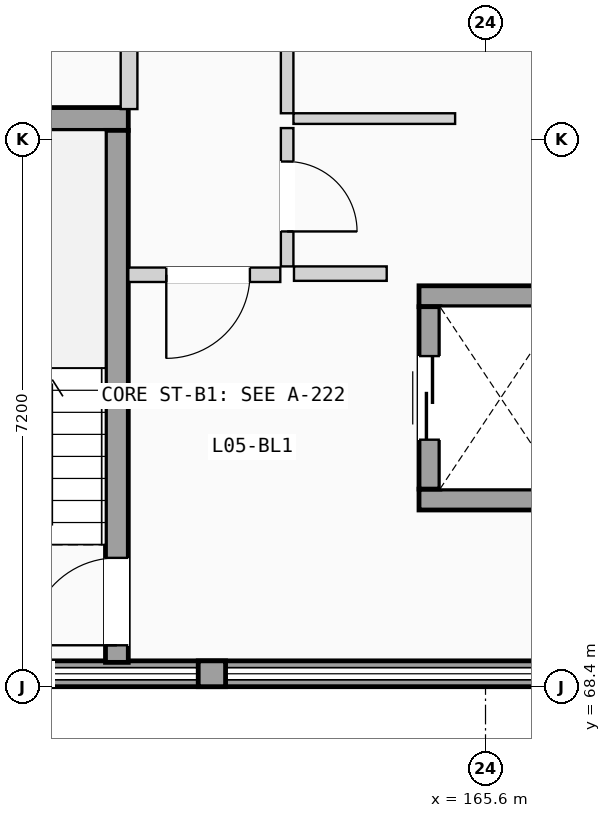
"""IFC4 building model, lengths in metres.
Left out: names, types, materials, properties, quantities, classifications, styles, units other than length and angle.
Written with IfcOpenShell. Run it as: python <this file> out.ifc"""

import sys

from ifc_helpers import new_model, si_unit, direction, frame, frame_2d, origin, place, context, subcontext, project, spatial, rectangle, extrude, element, fill, save


model = new_model("IFC4")
c1 = context("Model", 3, precision=1e-05, world=origin(), true_north=direction((0.0, 1.0)))
c2 = subcontext(c1, "Body", "Model", "MODEL_VIEW")
j1 = project(units=[si_unit("LENGTHUNIT", "METRE"), si_unit("PLANEANGLEUNIT", "RADIAN")], contexts=[c1])
p1 = place(None, origin())
s1 = spatial("IfcSite", under=j1, at=p1, CompositionType="ELEMENT")
p2 = place(p1, origin())
s2 = spatial("IfcBuilding", under=s1, at=p2, CompositionType="ELEMENT")
p3 = place(p2, frame((0.0, 0.0, 18.375)))
s3 = spatial("IfcBuildingStorey", under=s2, at=p3, CompositionType="ELEMENT", Elevation=18.375)
p4 = place(p3, frame((151.2, 68.57, 0.0), z_axis=(0.0, 0.0, 1.0), x_axis=(1.0, 0.0, 0.0)))
e1 = element("IfcWall", 1, at=p4, inside=s3, PredefinedType="SOLIDWALL", context=c2, shape_type="SweptSolid", body=[
    extrude(rectangle(XDim=21.6, YDim=0.34, at=frame_2d((10.8, 0.0))), origin(), (0.0, 0.0, 1.0), 1.11),
])
p5 = place(p3, frame((161.82, 68.57, 1.11), z_axis=(0.0, 0.0, 1.0), x_axis=(1.0, 0.0, 0.0)))
e2 = element("IfcWall", 2, at=p5, inside=s3, PredefinedType="SOLIDWALL", context=c2, shape_type="SweptSolid", body=[
    extrude(rectangle(XDim=0.36, YDim=0.34, at=frame_2d((0.18, 0.0))), origin(), (0.0, 0.0, 1.0), 1.78),
])
p6 = place(p3, frame((156.95, 75.87, 0.0), z_axis=(0.0, 0.0, 1.0), x_axis=(1.0, 0.0, 0.0)))
e3 = element("IfcWall", 3, at=p6, inside=s3, PredefinedType="SHEAR", context=c2, shape_type="SweptSolid", body=[
    extrude(rectangle(XDim=3.95, YDim=0.3, at=frame_2d((1.975, 0.0))), origin(), (0.0, 0.0, 1.0), 2.89),
])
p7 = place(p3, frame((160.75, 68.72, 0.0), z_axis=(0.0, 0.0, 1.0), x_axis=(0.0, 1.0, 0.0)))
e4 = element("IfcWall", 4, at=p7, inside=s3, PredefinedType="SHEAR", context=c2, shape_type="SweptSolid", body=[
    extrude(rectangle(XDim=7.0, YDim=0.3, at=frame_2d((3.5, 0.0))), origin(), (0.0, 0.0, 1.0), 2.89),
])
p8 = place(p7, frame((0.225, 0.0, 0.0)))
e5 = element("IfcOpeningElement", 5, at=p8, cuts=e4, PredefinedType="OPENING", context=c2, shape_type="SweptSolid", body=[
    extrude(rectangle(XDim=1.15, YDim=2.12, at=frame_2d((0.575, 1.06))), frame((0.0, 0.16, 0.0), z_axis=(0.0, -1.0, 0.0), x_axis=(1.0, 0.0, 0.0)), (0.0, 0.0, 1.0), 0.32),
])
for number, where, z_axis, x_axis in (
    (6, (164.725, 70.863, 0.0), (0.0, 0.0, 1.0), (1.0, 0.0, 0.0)),
    (7, (164.725, 73.538, 0.0), (0.0, 0.0, 1.0), (1.0, 0.0, 0.0)),
):
    element("IfcWall", number, at=place(p3, frame(where, z_axis=z_axis, x_axis=x_axis)), inside=s3, PredefinedType="SHEAR", context=c2, shape_type="SweptSolid", body=[
        extrude(rectangle(XDim=2.15, YDim=0.275, at=frame_2d((1.075, 0.0))), origin(), (0.0, 0.0, 1.0), 2.89),
    ])
p9 = place(p3, frame((164.863, 71.0, 0.0), z_axis=(0.0, 0.0, 1.0), x_axis=(0.0, 1.0, 0.0)))
e8 = element("IfcWall", 8, at=p9, inside=s3, PredefinedType="SHEAR", context=c2, shape_type="SweptSolid", body=[
    extrude(rectangle(XDim=2.4, YDim=0.275, at=frame_2d((1.2, 0.0))), origin(), (0.0, 0.0, 1.0), 2.89),
])
p10 = place(p9, frame((0.65, 0.0, 0.0)))
e9 = element("IfcOpeningElement", 9, at=p10, cuts=e8, PredefinedType="OPENING", context=c2, shape_type="SweptSolid", body=[
    extrude(rectangle(XDim=1.1, YDim=2.15, at=frame_2d((0.55, 1.075))), frame((0.0, 0.147, 0.0), z_axis=(0.0, -1.0, 0.0), x_axis=(1.0, 0.0, 0.0)), (0.0, 0.0, 1.0), 0.295),
])
p11 = place(p3, frame((163.08, 73.835, 0.0), z_axis=(0.0, 0.0, 1.0), x_axis=(1.0, 0.0, 0.0)))
e10 = element("IfcWall", 10, at=p11, inside=s3, PredefinedType="PARTITIONING", context=c2, shape_type="SweptSolid", body=[
    extrude(rectangle(XDim=1.22, YDim=0.19, at=frame_2d((0.61, 0.0))), origin(), (0.0, 0.0, 1.0), 2.87),
])
p12 = place(p3, frame((160.9, 73.82, 0.0), z_axis=(0.0, 0.0, 1.0), x_axis=(1.0, 0.0, 0.0)))
e11 = element("IfcWall", 11, at=p12, inside=s3, PredefinedType="PARTITIONING", context=c2, shape_type="SweptSolid", body=[
    extrude(rectangle(XDim=2.0, YDim=0.19, at=frame_2d((1.0, 0.0))), origin(), (0.0, 0.0, 1.0), 2.87),
])
p13 = place(p12, frame((0.5, 0.0, 0.0)))
e12 = element("IfcOpeningElement", 12, at=p13, cuts=e11, PredefinedType="OPENING", context=c2, shape_type="SweptSolid", body=[
    extrude(rectangle(XDim=1.1, YDim=2.12, at=frame_2d((0.55, 1.06))), frame((0.0, 0.105, 0.0), z_axis=(0.0, -1.0, 0.0), x_axis=(1.0, 0.0, 0.0)), (0.0, 0.0, 1.0), 0.21),
])
p14 = place(p3, frame((162.99, 73.93, 0.0), z_axis=(0.0, 0.0, 1.0), x_axis=(0.0, 1.0, 0.0)))
e13 = element("IfcWall", 13, at=p14, inside=s3, PredefinedType="PARTITIONING", context=c2, shape_type="SweptSolid", body=[
    extrude(rectangle(XDim=1.82, YDim=0.165, at=frame_2d((0.91, 0.0))), origin(), (0.0, 0.0, 1.0), 2.87),
])
p15 = place(p14, frame((0.46, 0.0, 0.0)))
e14 = element("IfcOpeningElement", 14, at=p15, cuts=e13, PredefinedType="OPENING", context=c2, shape_type="SweptSolid", body=[
    extrude(rectangle(XDim=0.92, YDim=2.04, at=frame_2d((0.46, 1.02))), frame((0.0, 0.093, 0.0), z_axis=(0.0, -1.0, 0.0), x_axis=(1.0, 0.0, 0.0)), (0.0, 0.0, 1.0), 0.185),
])
p16 = place(p3, frame((163.073, 75.875, 0.0), z_axis=(0.0, 0.0, 1.0), x_axis=(1.0, 0.0, 0.0)))
e15 = element("IfcWall", 15, at=p16, inside=s3, PredefinedType="PARTITIONING", context=c2, shape_type="SweptSolid", body=[
    extrude(rectangle(XDim=2.127, YDim=0.14, at=frame_2d((1.063, 0.0))), origin(), (0.0, 0.0, 1.0), 2.87),
])
p17 = place(p3, frame((160.91, 76.0, 0.0), z_axis=(0.0, 0.0, 1.0), x_axis=(0.0, 1.0, 0.0)))
e16 = element("IfcWall", 16, at=p17, inside=s3, PredefinedType="PLUMBINGWALL", context=c2, shape_type="SweptSolid", body=[
    extrude(rectangle(XDim=5.785, YDim=0.22, at=frame_2d((2.893, 0.0))), origin(), (0.0, 0.0, 1.0), 2.87),
])
p18 = place(p3, frame((162.99, 75.945, 0.0), z_axis=(0.0, 0.0, 1.0), x_axis=(0.0, 1.0, 0.0)))
e17 = element("IfcWall", 17, at=p18, inside=s3, PredefinedType="PARTITIONING", context=c2, shape_type="SweptSolid", body=[
    extrude(rectangle(XDim=6.271, YDim=0.165, at=frame_2d((3.135, 0.0))), origin(), (0.0, 0.0, 1.0), 2.87),
])
p19 = place(p18, frame((2.673, 0.0, 0.0)))
e18 = element("IfcOpeningElement", 18, at=p19, cuts=e17, PredefinedType="OPENING", context=c2, shape_type="SweptSolid", body=[
    extrude(rectangle(XDim=0.98, YDim=2.08, at=frame_2d((0.49, 1.04))), frame((0.0, 0.093, 0.0), z_axis=(0.0, -1.0, 0.0), x_axis=(1.0, 0.0, 0.0)), (0.0, 0.0, 1.0), 0.185),
])
p20 = place(p8, origin())
e19 = element("IfcDoor", 19, at=p20, inside=s3, OperationType="SINGLE_SWING_LEFT", PredefinedType="DOOR", context=c2, shape_type="SweptSolid", body=[
    extrude(rectangle(XDim=1.15, YDim=2.12, at=frame_2d((0.575, 1.06))), frame((0.0, 0.025, 0.0), z_axis=(0.0, -1.0, 0.0), x_axis=(1.0, 0.0, 0.0)), (0.0, 0.0, 1.0), 0.05),
])
fill(e5, e19)
p21 = place(p10, origin())
e20 = element("IfcDoor", 20, at=p21, inside=s3, OperationType="SLIDING_TO_LEFT", PredefinedType="DOOR", context=c2, shape_type="SweptSolid", body=[
    extrude(rectangle(XDim=1.1, YDim=2.15, at=frame_2d((0.55, 1.075))), frame((0.0, 0.025, 0.0), z_axis=(0.0, -1.0, 0.0), x_axis=(1.0, 0.0, 0.0)), (0.0, 0.0, 1.0), 0.05),
])
fill(e9, e20)
p22 = place(p13, frame((1.1, 0.0, 0.0), z_axis=(0.0, 0.0, 1.0), x_axis=(-1.0, 0.0, 0.0)))
e21 = element("IfcDoor", 21, at=p22, inside=s3, OperationType="SINGLE_SWING_LEFT", PredefinedType="DOOR", context=c2, shape_type="SweptSolid", body=[
    extrude(rectangle(XDim=1.1, YDim=2.12, at=frame_2d((0.55, 1.06))), frame((0.0, 0.025, 0.0), z_axis=(0.0, -1.0, 0.0), x_axis=(1.0, 0.0, 0.0)), (0.0, 0.0, 1.0), 0.05),
])
fill(e12, e21)
p23 = place(p15, frame((0.92, 0.0, 0.0), z_axis=(0.0, 0.0, 1.0), x_axis=(-1.0, 0.0, 0.0)))
e22 = element("IfcDoor", 22, at=p23, inside=s3, OperationType="SINGLE_SWING_LEFT", PredefinedType="DOOR", context=c2, shape_type="SweptSolid", body=[
    extrude(rectangle(XDim=0.92, YDim=2.04, at=frame_2d((0.46, 1.02))), frame((0.0, 0.025, 0.0), z_axis=(0.0, -1.0, 0.0), x_axis=(1.0, 0.0, 0.0)), (0.0, 0.0, 1.0), 0.05),
])
fill(e14, e22)
save(model, sys.argv[1])
